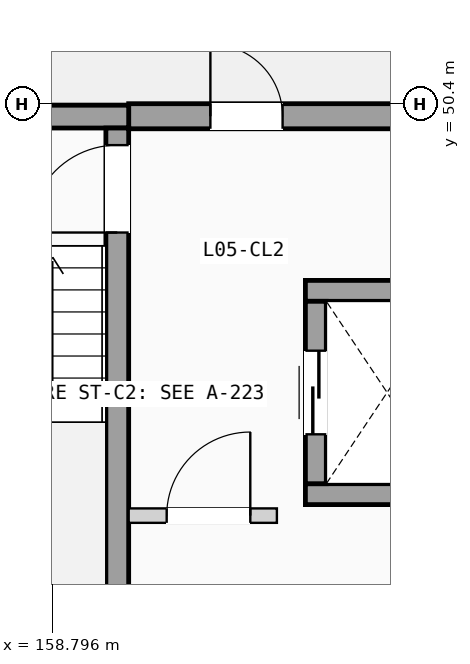
"""IFC4 building model, lengths in metres.
Left out: names, types, materials, properties, quantities, classifications, styles, units other than length and angle.
Written with IfcOpenShell. Run it as: python <this file> out.ifc"""

import sys

from ifc_helpers import new_model, si_unit, direction, frame, frame_2d, origin, place, context, subcontext, project, spatial, rectangle, extrude, element, fill, save


model = new_model("IFC4")
c1 = context("Model", 3, precision=1e-05, world=origin(), true_north=direction((0.0, 1.0)))
c2 = subcontext(c1, "Body", "Model", "MODEL_VIEW")
j1 = project(units=[si_unit("LENGTHUNIT", "METRE"), si_unit("PLANEANGLEUNIT", "RADIAN")], contexts=[c1])
p1 = place(None, origin())
s1 = spatial("IfcSite", under=j1, at=p1, CompositionType="ELEMENT")
p2 = place(p1, origin())
s2 = spatial("IfcBuilding", under=s1, at=p2, CompositionType="ELEMENT")
p3 = place(p2, frame((0.0, 0.0, 18.375)))
s3 = spatial("IfcBuildingStorey", under=s2, at=p3, CompositionType="ELEMENT", Elevation=18.375)
p4 = place(p3, frame((159.8, 50.235, 0.0), z_axis=(0.0, 0.0, 1.0), x_axis=(1.0, 0.0, 0.0)))
e1 = element("IfcWall", 1, at=p4, inside=s3, PredefinedType="SOLIDWALL", context=c2, shape_type="SweptSolid", body=[
    extrude(rectangle(XDim=4.1, YDim=0.33, at=frame_2d((2.05, 0.0))), origin(), (0.0, 0.0, 1.0), 2.89),
])
p5 = place(p4, frame((1.075, 0.0, 0.0)))
e2 = element("IfcOpeningElement", 2, at=p5, cuts=e1, PredefinedType="OPENING", context=c2, shape_type="SweptSolid", body=[
    extrude(rectangle(XDim=0.95, YDim=2.15, at=frame_2d((0.475, 1.075))), frame((0.0, 0.175, 0.0), z_axis=(0.0, -1.0, 0.0), x_axis=(1.0, 0.0, 0.0)), (0.0, 0.0, 1.0), 0.35),
])
p6 = place(p3, frame((156.2, 50.23, 0.0), z_axis=(0.0, 0.0, 1.0), x_axis=(1.0, 0.0, 0.0)))
e3 = element("IfcWall", 3, at=p6, inside=s3, PredefinedType="SHEAR", context=c2, shape_type="SweptSolid", body=[
    extrude(rectangle(XDim=3.6, YDim=0.3, at=frame_2d((1.8, 0.0))), origin(), (0.0, 0.0, 1.0), 2.89),
])
p7 = place(p3, frame((159.65, 43.08, 0.0), z_axis=(0.0, 0.0, 1.0), x_axis=(0.0, 1.0, 0.0)))
e4 = element("IfcWall", 4, at=p7, inside=s3, PredefinedType="SHEAR", context=c2, shape_type="SweptSolid", body=[
    extrude(rectangle(XDim=7.0, YDim=0.3, at=frame_2d((3.5, 0.0))), origin(), (0.0, 0.0, 1.0), 2.89),
])
p8 = place(p7, frame((5.625, 0.0, 0.0)))
e5 = element("IfcOpeningElement", 5, at=p8, cuts=e4, PredefinedType="OPENING", context=c2, shape_type="SweptSolid", body=[
    extrude(rectangle(XDim=1.15, YDim=2.12, at=frame_2d((0.575, 1.06))), frame((0.0, 0.16, 0.0), z_axis=(0.0, -1.0, 0.0), x_axis=(1.0, 0.0, 0.0)), (0.0, 0.0, 1.0), 0.32),
])
for number, where, z_axis, x_axis in (
    (6, (162.125, 45.262, 0.0), (0.0, 0.0, 1.0), (1.0, 0.0, 0.0)),
    (7, (162.125, 47.938, 0.0), (0.0, 0.0, 1.0), (1.0, 0.0, 0.0)),
):
    element("IfcWall", number, at=place(p3, frame(where, z_axis=z_axis, x_axis=x_axis)), inside=s3, PredefinedType="SHEAR", context=c2, shape_type="SweptSolid", body=[
        extrude(rectangle(XDim=2.15, YDim=0.275, at=frame_2d((1.075, 0.0))), origin(), (0.0, 0.0, 1.0), 2.89),
    ])
p9 = place(p3, frame((162.262, 45.4, 0.0), z_axis=(0.0, 0.0, 1.0), x_axis=(0.0, 1.0, 0.0)))
e8 = element("IfcWall", 8, at=p9, inside=s3, PredefinedType="SHEAR", context=c2, shape_type="SweptSolid", body=[
    extrude(rectangle(XDim=2.4, YDim=0.275, at=frame_2d((1.2, 0.0))), origin(), (0.0, 0.0, 1.0), 2.89),
])
p10 = place(p9, frame((0.65, 0.0, 0.0)))
e9 = element("IfcOpeningElement", 9, at=p10, cuts=e8, PredefinedType="OPENING", context=c2, shape_type="SweptSolid", body=[
    extrude(rectangle(XDim=1.1, YDim=2.15, at=frame_2d((0.55, 1.075))), frame((0.0, 0.147, 0.0), z_axis=(0.0, -1.0, 0.0), x_axis=(1.0, 0.0, 0.0)), (0.0, 0.0, 1.0), 0.295),
])
p11 = place(p3, frame((159.8, 44.98, 0.0), z_axis=(0.0, 0.0, 1.0), x_axis=(1.0, 0.0, 0.0)))
e10 = element("IfcWall", 10, at=p11, inside=s3, PredefinedType="PARTITIONING", context=c2, shape_type="SweptSolid", body=[
    extrude(rectangle(XDim=1.95, YDim=0.19, at=frame_2d((0.975, 0.0))), origin(), (0.0, 0.0, 1.0), 2.87),
])
p12 = place(p11, frame((0.5, 0.0, 0.0)))
e11 = element("IfcOpeningElement", 11, at=p12, cuts=e10, PredefinedType="OPENING", context=c2, shape_type="SweptSolid", body=[
    extrude(rectangle(XDim=1.1, YDim=2.12, at=frame_2d((0.55, 1.06))), frame((0.0, 0.105, 0.0), z_axis=(0.0, -1.0, 0.0), x_axis=(1.0, 0.0, 0.0)), (0.0, 0.0, 1.0), 0.21),
])
p13 = place(p5, origin())
e12 = element("IfcDoor", 12, at=p13, inside=s3, OperationType="SINGLE_SWING_LEFT", PredefinedType="DOOR", context=c2, shape_type="SweptSolid", body=[
    extrude(rectangle(XDim=0.95, YDim=2.15, at=frame_2d((0.475, 1.075))), frame((0.0, 0.025, 0.0), z_axis=(0.0, -1.0, 0.0), x_axis=(1.0, 0.0, 0.0)), (0.0, 0.0, 1.0), 0.05),
])
fill(e2, e12)
p14 = place(p8, origin())
e13 = element("IfcDoor", 13, at=p14, inside=s3, OperationType="SINGLE_SWING_LEFT", PredefinedType="DOOR", context=c2, shape_type="SweptSolid", body=[
    extrude(rectangle(XDim=1.15, YDim=2.12, at=frame_2d((0.575, 1.06))), frame((0.0, 0.025, 0.0), z_axis=(0.0, -1.0, 0.0), x_axis=(1.0, 0.0, 0.0)), (0.0, 0.0, 1.0), 0.05),
])
fill(e5, e13)
p15 = place(p10, origin())
e14 = element("IfcDoor", 14, at=p15, inside=s3, OperationType="SLIDING_TO_LEFT", PredefinedType="DOOR", context=c2, shape_type="SweptSolid", body=[
    extrude(rectangle(XDim=1.1, YDim=2.15, at=frame_2d((0.55, 1.075))), frame((0.0, 0.025, 0.0), z_axis=(0.0, -1.0, 0.0), x_axis=(1.0, 0.0, 0.0)), (0.0, 0.0, 1.0), 0.05),
])
fill(e9, e14)
p16 = place(p12, origin())
e15 = element("IfcDoor", 15, at=p16, inside=s3, OperationType="SINGLE_SWING_RIGHT", PredefinedType="DOOR", context=c2, shape_type="SweptSolid", body=[
    extrude(rectangle(XDim=1.1, YDim=2.12, at=frame_2d((0.55, 1.06))), frame((0.0, 0.025, 0.0), z_axis=(0.0, -1.0, 0.0), x_axis=(1.0, 0.0, 0.0)), (0.0, 0.0, 1.0), 0.05),
])
fill(e11, e15)
save(model, sys.argv[1])
